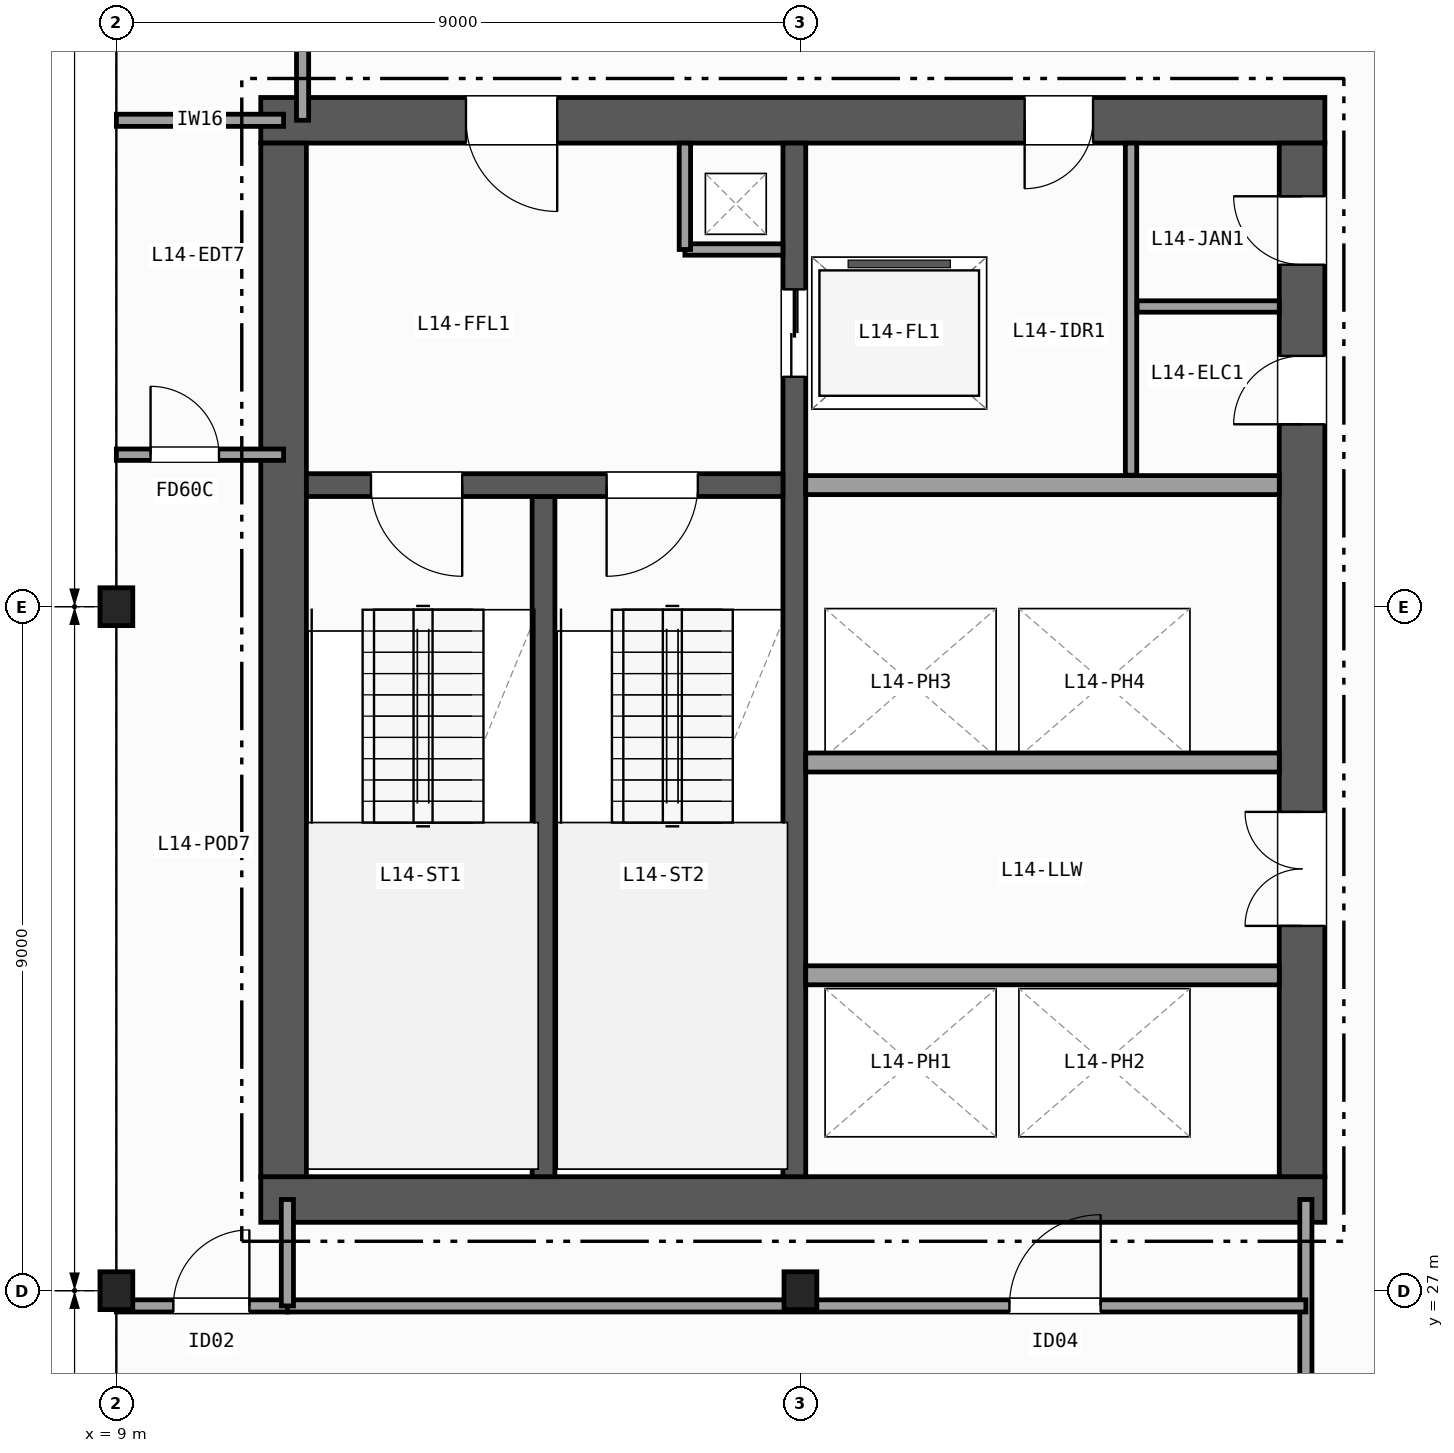
"""IFC4 building model, lengths in metres.
Left out: names, types, materials, properties, quantities, classifications, styles, units other than length and angle.
Written with IfcOpenShell. Run it as: python <this file> out.ifc"""

import sys

from ifc_helpers import new_model, si_unit, direction, frame, frame_2d, origin, origin_2d, place, context, subcontext, project, spatial, rectangle, i_section, extrude, element, fill, save


model = new_model("IFC4")
c1 = context("Model", 3, precision=1e-05, world=origin(), true_north=direction((0.0, 1.0)))
c2 = subcontext(c1, "Body", "Model", "MODEL_VIEW")
j1 = project(units=[si_unit("LENGTHUNIT", "METRE"), si_unit("PLANEANGLEUNIT", "RADIAN")], contexts=[c1])
p1 = place(None, origin())
s1 = spatial("IfcSite", under=j1, at=p1, CompositionType="ELEMENT")
p2 = place(p1, origin())
s2 = spatial("IfcBuilding", under=s1, at=p2, CompositionType="ELEMENT")
p3 = place(p2, frame((0.0, 0.0, 61.9)))
s3 = spatial("IfcBuildingStorey", under=s2, at=p3, CompositionType="ELEMENT", Elevation=61.9)
for number, where, z_axis, x_axis in (
    (1, (9.0, 27.0, 0.0), (0.0, 0.0, 1.0), (1.0, 0.0, 0.0)),
    (2, (9.0, 36.0, 0.0), (0.0, 0.0, 1.0), (1.0, 0.0, 0.0)),
    (3, (18.0, 27.0, 0.0), (0.0, 0.0, 1.0), (1.0, 0.0, 0.0)),
):
    element("IfcColumn", number, at=place(p3, frame(where, z_axis=z_axis, x_axis=x_axis)), inside=s3, PredefinedType="COLUMN", context=c2, shape_type="SweptSolid", body=[
        extrude(i_section(OverallWidth=0.432, OverallDepth=0.498, WebThickness=0.056, FlangeThickness=0.089, FilletRadius=0.015, at=origin_2d()), origin(), (0.0, 0.0, 1.0), 3.7),
    ])
p4 = place(p3, frame((10.9, 28.2, 0.0), z_axis=(0.0, 0.0, 1.0), x_axis=(1.0, 0.0, 0.0)))
e4 = element("IfcWall", 4, at=p4, inside=s3, PredefinedType="SHEAR", context=c2, shape_type="SweptSolid", body=[
    extrude(rectangle(XDim=14.0, YDim=0.6, at=frame_2d((7.0, 0.0))), origin(), (0.0, 0.0, 1.0), 3.42),
])
p5 = place(p3, frame((24.9, 42.4, 0.0), z_axis=(0.0, 0.0, 1.0), x_axis=(-1.0, 0.0, 0.0)))
e5 = element("IfcWall", 5, at=p5, inside=s3, PredefinedType="SHEAR", context=c2, shape_type="SweptSolid", body=[
    extrude(rectangle(XDim=14.0, YDim=0.6, at=frame_2d((7.0, 0.0))), origin(), (0.0, 0.0, 1.0), 3.42),
])
p6 = place(p5, frame((10.1, 0.0, 0.0)))
e6 = element("IfcOpeningElement", 6, at=p6, cuts=e5, PredefinedType="OPENING", context=c2, shape_type="SweptSolid", body=[
    extrude(rectangle(XDim=1.2, YDim=2.15, at=frame_2d((0.6, 1.075))), frame((0.0, 0.31, 0.0), z_axis=(0.0, -1.0, 0.0), x_axis=(1.0, 0.0, 0.0)), (0.0, 0.0, 1.0), 0.62),
])
p7 = place(p5, frame((3.05, 0.0, 0.0)))
e7 = element("IfcOpeningElement", 7, at=p7, cuts=e5, PredefinedType="OPENING", context=c2, shape_type="SweptSolid", body=[
    extrude(rectangle(XDim=0.9, YDim=2.1, at=frame_2d((0.45, 1.05))), frame((0.0, 0.31, 0.0), z_axis=(0.0, -1.0, 0.0), x_axis=(1.0, 0.0, 0.0)), (0.0, 0.0, 1.0), 0.62),
])
p8 = place(p3, frame((11.2, 42.1, 0.0), z_axis=(0.0, 0.0, 1.0), x_axis=(0.0, -1.0, 0.0)))
e8 = element("IfcWall", 8, at=p8, inside=s3, PredefinedType="SHEAR", context=c2, shape_type="SweptSolid", body=[
    extrude(rectangle(XDim=13.6, YDim=0.6, at=frame_2d((6.8, 0.0))), origin(), (0.0, 0.0, 1.0), 3.42),
])
p9 = place(p3, frame((24.6, 28.5, 0.0), z_axis=(0.0, 0.0, 1.0), x_axis=(0.0, 1.0, 0.0)))
e9 = element("IfcWall", 9, at=p9, inside=s3, PredefinedType="SHEAR", context=c2, shape_type="SweptSolid", body=[
    extrude(rectangle(XDim=13.6, YDim=0.6, at=frame_2d((6.8, 0.0))), origin(), (0.0, 0.0, 1.0), 3.42),
])
p10 = place(p9, frame((3.3, 0.0, 0.0)))
e10 = element("IfcOpeningElement", 10, at=p10, cuts=e9, PredefinedType="OPENING", context=c2, shape_type="SweptSolid", body=[
    extrude(rectangle(XDim=1.5, YDim=2.2, at=frame_2d((0.75, 1.1))), frame((0.0, 0.31, 0.0), z_axis=(0.0, -1.0, 0.0), x_axis=(1.0, 0.0, 0.0)), (0.0, 0.0, 1.0), 0.62),
])
p11 = place(p9, frame((9.9, 0.0, 0.0)))
e11 = element("IfcOpeningElement", 11, at=p11, cuts=e9, PredefinedType="OPENING", context=c2, shape_type="SweptSolid", body=[
    extrude(rectangle(XDim=0.9, YDim=2.1, at=frame_2d((0.45, 1.05))), frame((0.0, 0.31, 0.0), z_axis=(0.0, -1.0, 0.0), x_axis=(1.0, 0.0, 0.0)), (0.0, 0.0, 1.0), 0.62),
])
p12 = place(p9, frame((12.0, 0.0, 0.0)))
e12 = element("IfcOpeningElement", 12, at=p12, cuts=e9, PredefinedType="OPENING", context=c2, shape_type="SweptSolid", body=[
    extrude(rectangle(XDim=0.9, YDim=2.1, at=frame_2d((0.45, 1.05))), frame((0.0, 0.31, 0.0), z_axis=(0.0, -1.0, 0.0), x_axis=(1.0, 0.0, 0.0)), (0.0, 0.0, 1.0), 0.62),
])
p13 = place(p3, frame((14.62, 28.5, 0.0), z_axis=(0.0, 0.0, 1.0), x_axis=(0.0, 1.0, 0.0)))
e13 = element("IfcWall", 13, at=p13, inside=s3, PredefinedType="SHEAR", context=c2, shape_type="SweptSolid", body=[
    extrude(rectangle(XDim=8.95, YDim=0.3, at=frame_2d((4.475, 0.0))), origin(), (0.0, 0.0, 1.0), 3.42),
])
p14 = place(p3, frame((17.92, 42.1, 0.0), z_axis=(0.0, 0.0, 1.0), x_axis=(0.0, -1.0, 0.0)))
e14 = element("IfcWall", 14, at=p14, inside=s3, PredefinedType="SHEAR", context=c2, shape_type="SweptSolid", body=[
    extrude(rectangle(XDim=13.6, YDim=0.3, at=frame_2d((6.8, 0.0))), origin(), (0.0, 0.0, 1.0), 3.42),
])
p15 = place(p14, frame((1.925, 0.0, 0.0)))
e15 = element("IfcOpeningElement", 15, at=p15, cuts=e14, PredefinedType="OPENING", context=c2, shape_type="SweptSolid", body=[
    extrude(rectangle(XDim=1.15, YDim=2.15, at=frame_2d((0.575, 1.075))), frame((0.0, 0.16, 0.0), z_axis=(0.0, -1.0, 0.0), x_axis=(1.0, 0.0, 0.0)), (0.0, 0.0, 1.0), 0.32),
])
p16 = place(p3, frame((17.77, 37.6, 0.0), z_axis=(0.0, 0.0, 1.0), x_axis=(-1.0, 0.0, 0.0)))
e16 = element("IfcWall", 16, at=p16, inside=s3, PredefinedType="SHEAR", context=c2, shape_type="SweptSolid", body=[
    extrude(rectangle(XDim=6.27, YDim=0.3, at=frame_2d((3.135, 0.0))), origin(), (0.0, 0.0, 1.0), 3.42),
])
p17 = place(p16, frame((4.22, 0.0, 0.0)))
e17 = element("IfcOpeningElement", 17, at=p17, cuts=e16, PredefinedType="OPENING", context=c2, shape_type="SweptSolid", body=[
    extrude(rectangle(XDim=1.2, YDim=2.15, at=frame_2d((0.6, 1.075))), frame((0.0, 0.16, 0.0), z_axis=(0.0, -1.0, 0.0), x_axis=(1.0, 0.0, 0.0)), (0.0, 0.0, 1.0), 0.32),
])
p18 = place(p16, frame((1.12, 0.0, 0.0)))
e18 = element("IfcOpeningElement", 18, at=p18, cuts=e16, PredefinedType="OPENING", context=c2, shape_type="SweptSolid", body=[
    extrude(rectangle(XDim=1.2, YDim=2.15, at=frame_2d((0.6, 1.075))), frame((0.0, 0.16, 0.0), z_axis=(0.0, -1.0, 0.0), x_axis=(1.0, 0.0, 0.0)), (0.0, 0.0, 1.0), 0.32),
])
p19 = place(p3, frame((16.48, 40.7, 0.0), z_axis=(0.0, 0.0, 1.0), x_axis=(1.0, 0.0, 0.0)))
e19 = element("IfcWall", 19, at=p19, inside=s3, PredefinedType="PARTITIONING", context=c2, shape_type="SweptSolid", body=[
    extrude(rectangle(XDim=1.29, YDim=0.15, at=frame_2d((0.645, 0.0))), origin(), (0.0, 0.0, 1.0), 3.42),
])
p20 = place(p3, frame((16.48, 40.7, 0.0), z_axis=(0.0, 0.0, 1.0), x_axis=(0.0, 1.0, 0.0)))
e20 = element("IfcWall", 20, at=p20, inside=s3, PredefinedType="PARTITIONING", context=c2, shape_type="SweptSolid", body=[
    extrude(rectangle(XDim=1.4, YDim=0.15, at=frame_2d((0.7, 0.0))), origin(), (0.0, 0.0, 1.0), 3.42),
])
for number, where, z_axis, x_axis in (
    (21, (18.07, 37.6, 0.0), (0.0, 0.0, 1.0), (1.0, 0.0, 0.0)),
    (22, (18.07, 31.15, 0.0), (0.0, 0.0, 1.0), (1.0, 0.0, 0.0)),
    (23, (24.3, 33.95, 0.0), (0.0, 0.0, 1.0), (-1.0, 0.0, 0.0)),
):
    element("IfcWall", number, at=place(p3, frame(where, z_axis=z_axis, x_axis=x_axis)), inside=s3, PredefinedType="PARTITIONING", context=c2, shape_type="SweptSolid", body=[
        extrude(rectangle(XDim=6.23, YDim=0.25, at=frame_2d((3.115, 0.0))), origin(), (0.0, 0.0, 1.0), 3.42),
    ])
p21 = place(p3, frame((22.35, 37.73, 0.0), z_axis=(0.0, 0.0, 1.0), x_axis=(0.0, 1.0, 0.0)))
e24 = element("IfcWall", 24, at=p21, inside=s3, PredefinedType="PARTITIONING", context=c2, shape_type="SweptSolid", body=[
    extrude(rectangle(XDim=4.37, YDim=0.15, at=frame_2d((2.185, 0.0))), origin(), (0.0, 0.0, 1.0), 3.42),
])
p22 = place(p3, frame((22.43, 39.95, 0.0), z_axis=(0.0, 0.0, 1.0), x_axis=(1.0, 0.0, 0.0)))
e25 = element("IfcWall", 25, at=p22, inside=s3, PredefinedType="PARTITIONING", context=c2, shape_type="SweptSolid", body=[
    extrude(rectangle(XDim=1.87, YDim=0.15, at=frame_2d((0.935, 0.0))), origin(), (0.0, 0.0, 1.0), 3.42),
])
p23 = place(p3, frame((9.0, 26.8, 0.0), z_axis=(0.0, 0.0, 1.0), x_axis=(1.0, 0.0, 0.0)))
e26 = element("IfcWall", 26, at=p23, inside=s3, PredefinedType="PARTITIONING", context=c2, shape_type="SweptSolid", body=[
    extrude(rectangle(XDim=2.25, YDim=0.16, at=frame_2d((1.125, 0.0))), origin(), (0.0, 0.0, 1.0), 2.627),
])
p24 = place(p23, frame((0.75, 0.0, 0.0)))
e27 = element("IfcOpeningElement", 27, at=p24, cuts=e26, PredefinedType="OPENING", context=c2, shape_type="SweptSolid", body=[
    extrude(rectangle(XDim=1.0, YDim=2.1, at=frame_2d((0.5, 1.05))), frame((0.0, 0.09, 0.0), z_axis=(0.0, -1.0, 0.0), x_axis=(1.0, 0.0, 0.0)), (0.0, 0.0, 1.0), 0.18),
])
p25 = place(p3, frame((9.0, 42.4, 0.0), z_axis=(0.0, 0.0, 1.0), x_axis=(1.0, 0.0, 0.0)))
e28 = element("IfcWall", 28, at=p25, inside=s3, PredefinedType="PARTITIONING", context=c2, shape_type="SweptSolid", body=[
    extrude(rectangle(XDim=2.2, YDim=0.16, at=frame_2d((1.1, 0.0))), origin(), (0.0, 0.0, 1.0), 2.627),
])
p26 = place(p3, frame((11.45, 42.4, 0.0), z_axis=(0.0, 0.0, 1.0), x_axis=(0.0, 1.0, 0.0)))
e29 = element("IfcWall", 29, at=p26, inside=s3, PredefinedType="PARTITIONING", context=c2, shape_type="SweptSolid", body=[
    extrude(rectangle(XDim=2.1, YDim=0.16, at=frame_2d((1.05, 0.0))), origin(), (0.0, 0.0, 1.0), 3.42),
])
p27 = place(p3, frame((9.0, 38.0, 0.0), z_axis=(0.0, 0.0, 1.0), x_axis=(1.0, 0.0, 0.0)))
e30 = element("IfcWall", 30, at=p27, inside=s3, PredefinedType="PARTITIONING", context=c2, shape_type="SweptSolid", body=[
    extrude(rectangle(XDim=2.2, YDim=0.15, at=frame_2d((1.1, 0.0))), origin(), (0.0, 0.0, 1.0), 2.627),
])
p28 = place(p27, frame((0.45, 0.0, 0.0)))
e31 = element("IfcOpeningElement", 31, at=p28, cuts=e30, PredefinedType="OPENING", context=c2, shape_type="SweptSolid", body=[
    extrude(rectangle(XDim=0.9, YDim=2.1, at=frame_2d((0.45, 1.05))), frame((0.0, 0.085, 0.0), z_axis=(0.0, -1.0, 0.0), x_axis=(1.0, 0.0, 0.0)), (0.0, 0.0, 1.0), 0.17),
])
p29 = place(p3, frame((24.65, 9.0, 0.0), z_axis=(0.0, 0.0, 1.0), x_axis=(0.0, 1.0, 0.0)))
e32 = element("IfcWall", 32, at=p29, inside=s3, PredefinedType="PARTITIONING", context=c2, shape_type="SweptSolid", body=[
    extrude(rectangle(XDim=19.2, YDim=0.16, at=frame_2d((9.6, 0.0))), origin(), (0.0, 0.0, 1.0), 2.627),
])
p30 = place(p29, frame((2.8, 0.0, 0.0)))
e33 = element("IfcOpeningElement", 33, at=p30, cuts=e32, PredefinedType="OPENING", context=c2, shape_type="SweptSolid", body=[
    extrude(rectangle(XDim=0.86, YDim=2.05, at=frame_2d((0.43, 1.025))), frame((0.0, 0.09, 0.0), z_axis=(0.0, -1.0, 0.0), x_axis=(1.0, 0.0, 0.0)), (0.0, 0.0, 1.0), 0.18),
])
p31 = place(p29, frame((10.59, 0.0, 0.0)))
e34 = element("IfcOpeningElement", 34, at=p31, cuts=e32, PredefinedType="OPENING", context=c2, shape_type="SweptSolid", body=[
    extrude(rectangle(XDim=0.95, YDim=2.1, at=frame_2d((0.475, 1.05))), frame((0.0, 0.09, 0.0), z_axis=(0.0, -1.0, 0.0), x_axis=(1.0, 0.0, 0.0)), (0.0, 0.0, 1.0), 0.18),
])
p32 = place(p3, frame((11.25, 26.8, 0.0), z_axis=(0.0, 0.0, 1.0), x_axis=(1.0, 0.0, 0.0)))
e35 = element("IfcWall", 35, at=p32, inside=s3, PredefinedType="PARTITIONING", context=c2, shape_type="SweptSolid", body=[
    extrude(rectangle(XDim=13.4, YDim=0.16, at=frame_2d((6.7, 0.0))), origin(), (0.0, 0.0, 1.0), 2.789),
])
p33 = place(p32, frame((9.5, 0.0, 0.0)))
e36 = element("IfcOpeningElement", 36, at=p33, cuts=e35, PredefinedType="OPENING", context=c2, shape_type="SweptSolid", body=[
    extrude(rectangle(XDim=1.2, YDim=2.15, at=frame_2d((0.6, 1.075))), frame((0.0, 0.09, 0.0), z_axis=(0.0, -1.0, 0.0), x_axis=(1.0, 0.0, 0.0)), (0.0, 0.0, 1.0), 0.18),
])
p34 = place(p3, frame((11.25, 26.8, 0.0), z_axis=(0.0, 0.0, 1.0), x_axis=(0.0, 1.0, 0.0)))
e37 = element("IfcWall", 37, at=p34, inside=s3, PredefinedType="PARTITIONING", context=c2, shape_type="SweptSolid", body=[
    extrude(rectangle(XDim=1.4, YDim=0.16, at=frame_2d((0.7, 0.0))), origin(), (0.0, 0.0, 1.0), 2.789),
])
p35 = place(p17, origin())
e38 = element("IfcDoor", 38, at=p35, inside=s3, OperationType="SINGLE_SWING_LEFT", PredefinedType="DOOR", context=c2, shape_type="SweptSolid", body=[
    extrude(rectangle(XDim=1.2, YDim=2.15, at=frame_2d((0.6, 1.075))), frame((0.0, 0.025, 0.0), z_axis=(0.0, -1.0, 0.0), x_axis=(1.0, 0.0, 0.0)), (0.0, 0.0, 1.0), 0.05),
])
fill(e17, e38)
p36 = place(p18, origin())
e39 = element("IfcDoor", 39, at=p36, inside=s3, OperationType="SINGLE_SWING_RIGHT", PredefinedType="DOOR", context=c2, shape_type="SweptSolid", body=[
    extrude(rectangle(XDim=1.2, YDim=2.15, at=frame_2d((0.6, 1.075))), frame((0.0, 0.025, 0.0), z_axis=(0.0, -1.0, 0.0), x_axis=(1.0, 0.0, 0.0)), (0.0, 0.0, 1.0), 0.05),
])
fill(e18, e39)
p37 = place(p10, origin())
e40 = element("IfcDoor", 40, at=p37, inside=s3, OperationType="DOUBLE_DOOR_SINGLE_SWING", PredefinedType="DOOR", context=c2, shape_type="SweptSolid", body=[
    extrude(rectangle(XDim=1.5, YDim=2.2, at=frame_2d((0.75, 1.1))), frame((0.0, 0.025, 0.0), z_axis=(0.0, -1.0, 0.0), x_axis=(1.0, 0.0, 0.0)), (0.0, 0.0, 1.0), 0.05),
])
fill(e10, e40)
p38 = place(p6, origin())
e41 = element("IfcDoor", 41, at=p38, inside=s3, OperationType="SINGLE_SWING_LEFT", PredefinedType="DOOR", context=c2, shape_type="SweptSolid", body=[
    extrude(rectangle(XDim=1.2, YDim=2.15, at=frame_2d((0.6, 1.075))), frame((0.0, 0.025, 0.0), z_axis=(0.0, -1.0, 0.0), x_axis=(1.0, 0.0, 0.0)), (0.0, 0.0, 1.0), 0.05),
])
fill(e6, e41)
p39 = place(p11, origin())
e42 = element("IfcDoor", 42, at=p39, inside=s3, OperationType="SINGLE_SWING_LEFT", PredefinedType="DOOR", context=c2, shape_type="SweptSolid", body=[
    extrude(rectangle(XDim=0.9, YDim=2.1, at=frame_2d((0.45, 1.05))), frame((0.0, 0.025, 0.0), z_axis=(0.0, -1.0, 0.0), x_axis=(1.0, 0.0, 0.0)), (0.0, 0.0, 1.0), 0.05),
])
fill(e11, e42)
p40 = place(p7, origin())
e43 = element("IfcDoor", 43, at=p40, inside=s3, OperationType="SINGLE_SWING_RIGHT", PredefinedType="DOOR", context=c2, shape_type="SweptSolid", body=[
    extrude(rectangle(XDim=0.9, YDim=2.1, at=frame_2d((0.45, 1.05))), frame((0.0, 0.025, 0.0), z_axis=(0.0, -1.0, 0.0), x_axis=(1.0, 0.0, 0.0)), (0.0, 0.0, 1.0), 0.05),
])
fill(e7, e43)
p41 = place(p12, origin())
e44 = element("IfcDoor", 44, at=p41, inside=s3, OperationType="SINGLE_SWING_RIGHT", PredefinedType="DOOR", context=c2, shape_type="SweptSolid", body=[
    extrude(rectangle(XDim=0.9, YDim=2.1, at=frame_2d((0.45, 1.05))), frame((0.0, 0.025, 0.0), z_axis=(0.0, -1.0, 0.0), x_axis=(1.0, 0.0, 0.0)), (0.0, 0.0, 1.0), 0.05),
])
fill(e12, e44)
p42 = place(p15, origin())
e45 = element("IfcDoor", 45, at=p42, inside=s3, OperationType="DOUBLE_DOOR_SLIDING", PredefinedType="DOOR", context=c2, shape_type="SweptSolid", body=[
    extrude(rectangle(XDim=1.15, YDim=2.15, at=frame_2d((0.575, 1.075))), frame((0.0, 0.025, 0.0), z_axis=(0.0, -1.0, 0.0), x_axis=(1.0, 0.0, 0.0)), (0.0, 0.0, 1.0), 0.05),
])
fill(e15, e45)
p43 = place(p24, origin())
e46 = element("IfcDoor", 46, at=p43, inside=s3, OperationType="SINGLE_SWING_RIGHT", PredefinedType="DOOR", context=c2, shape_type="SweptSolid", body=[
    extrude(rectangle(XDim=1.0, YDim=2.1, at=frame_2d((0.5, 1.05))), frame((0.0, 0.025, 0.0), z_axis=(0.0, -1.0, 0.0), x_axis=(1.0, 0.0, 0.0)), (0.0, 0.0, 1.0), 0.05),
])
fill(e27, e46)
p44 = place(p28, origin())
e47 = element("IfcDoor", 47, at=p44, inside=s3, OperationType="SINGLE_SWING_LEFT", PredefinedType="DOOR", context=c2, shape_type="SweptSolid", body=[
    extrude(rectangle(XDim=0.9, YDim=2.1, at=frame_2d((0.45, 1.05))), frame((0.0, 0.025, 0.0), z_axis=(0.0, -1.0, 0.0), x_axis=(1.0, 0.0, 0.0)), (0.0, 0.0, 1.0), 0.05),
])
fill(e31, e47)
p45 = place(p33, origin())
e48 = element("IfcDoor", 48, at=p45, inside=s3, OperationType="SINGLE_SWING_RIGHT", PredefinedType="DOOR", context=c2, shape_type="SweptSolid", body=[
    extrude(rectangle(XDim=1.2, YDim=2.15, at=frame_2d((0.6, 1.075))), frame((0.0, 0.025, 0.0), z_axis=(0.0, -1.0, 0.0), x_axis=(1.0, 0.0, 0.0)), (0.0, 0.0, 1.0), 0.05),
])
fill(e36, e48)
save(model, sys.argv[1])
